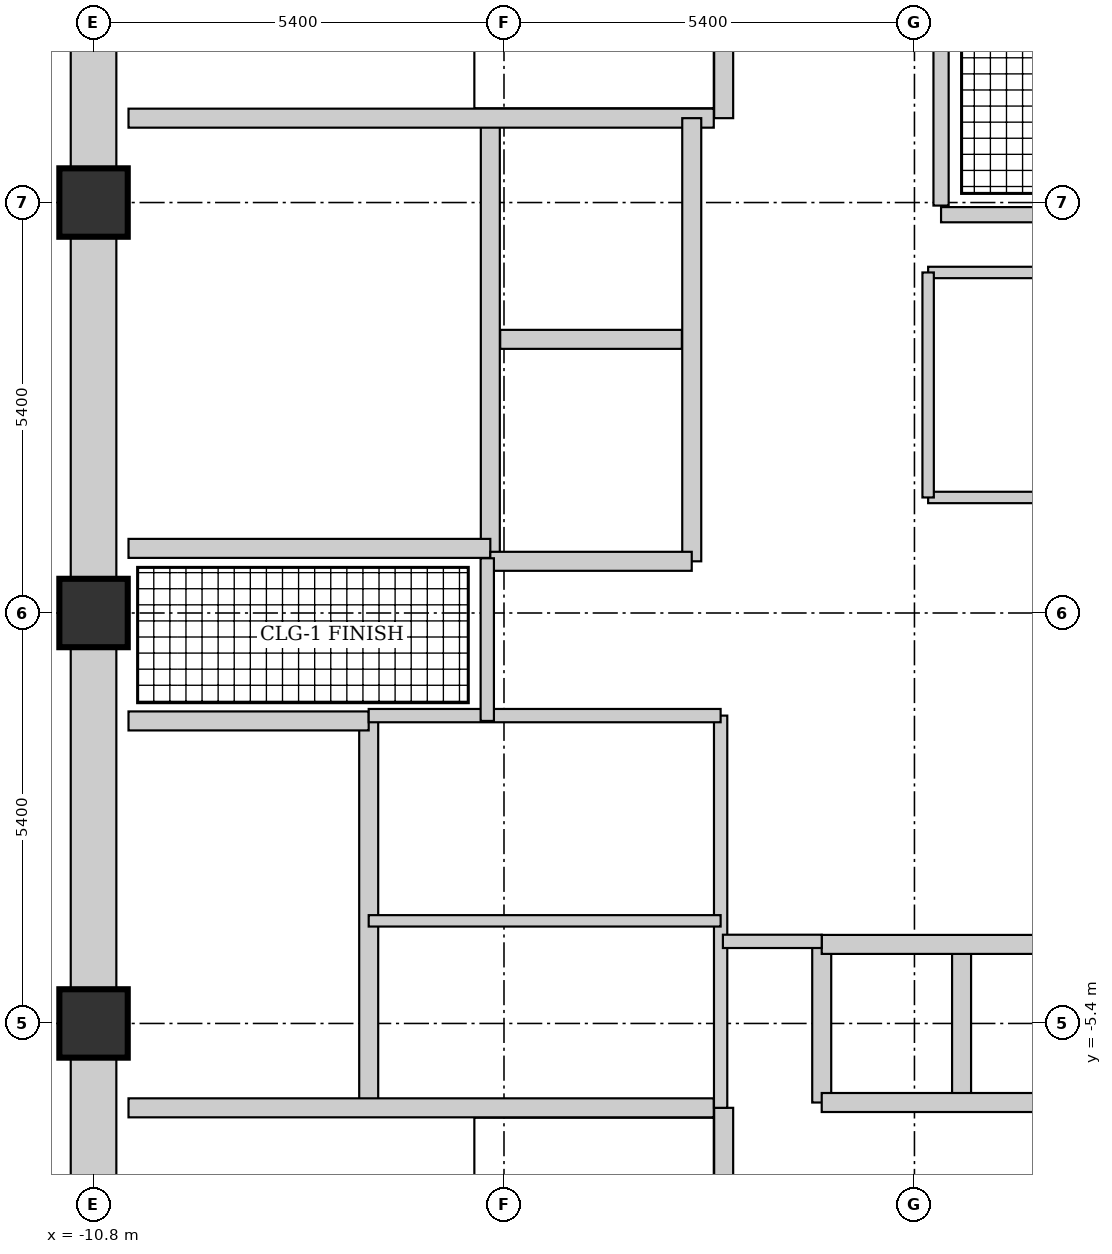
"""IFC4 building model, lengths in metres.
Left out: names, types, materials, properties, quantities, classifications, styles, units other than length and angle.
Written with IfcOpenShell. Run it as: python <this file> out.ifc"""

import sys

from ifc_helpers import new_model, si_unit, direction, frame, frame_2d, origin, origin_2d, place, context, subcontext, project, spatial, rectangle, extrude, element, fill, save


model = new_model("IFC4")
c1 = context("Model", 3, precision=1e-05, world=origin(), true_north=direction((0.0, 1.0)))
c2 = subcontext(c1, "Body", "Model", "MODEL_VIEW")
j1 = project(units=[si_unit("LENGTHUNIT", "METRE"), si_unit("PLANEANGLEUNIT", "RADIAN")], contexts=[c1])
p1 = place(None, origin())
s1 = spatial("IfcSite", under=j1, at=p1, CompositionType="ELEMENT")
p2 = place(p1, origin())
s2 = spatial("IfcBuilding", under=s1, at=p2, CompositionType="ELEMENT")
p3 = place(p2, frame((0.0, 0.0, 174.75)))
s3 = spatial("IfcBuildingStorey", under=s2, at=p3, CompositionType="ELEMENT", Elevation=174.75)
for number, where, z_axis, x_axis in (
    (1, (-10.8, -5.4, 0.0), (0.0, 0.0, 1.0), (1.0, 0.0, 0.0)),
    (2, (-10.8, 0.0, 0.0), (0.0, 0.0, 1.0), (1.0, 0.0, 0.0)),
    (3, (-10.8, 5.4, 0.0), (0.0, 0.0, 1.0), (1.0, 0.0, 0.0)),
):
    element("IfcColumn", number, at=place(p3, frame(where, z_axis=z_axis, x_axis=x_axis)), inside=s3, PredefinedType="COLUMN", context=c2, shape_type="SweptSolid", body=[
        extrude(rectangle(XDim=0.9, YDim=0.9, at=origin_2d()), origin(), (0.0, 0.0, 1.0), 3.75),
    ])
p4 = place(p3, frame((-10.8, -10.34, 0.0), z_axis=(0.0, 0.0, 1.0), x_axis=(0.0, 1.0, 0.0)))
e4 = element("IfcWall", 4, at=p4, inside=s3, PredefinedType="SHEAR", context=c2, shape_type="SweptSolid", body=[
    extrude(rectangle(XDim=4.48, YDim=0.6, at=frame_2d((2.24, 0.0))), origin(), (0.0, 0.0, 1.0), 3.75),
])
p5 = place(p3, frame((-10.8, -4.94, 0.0), z_axis=(0.0, 0.0, 1.0), x_axis=(0.0, 1.0, 0.0)))
e5 = element("IfcWall", 5, at=p5, inside=s3, PredefinedType="SHEAR", context=c2, shape_type="SweptSolid", body=[
    extrude(rectangle(XDim=4.48, YDim=0.6, at=frame_2d((2.24, 0.0))), origin(), (0.0, 0.0, 1.0), 3.75),
])
p6 = place(p5, frame((1.69, 0.0, 0.0)))
e6 = element("IfcOpeningElement", 6, at=p6, cuts=e5, PredefinedType="OPENING", context=c2, shape_type="SweptSolid", body=[
    extrude(rectangle(XDim=1.1, YDim=2.1, at=frame_2d((0.55, 1.05))), frame((0.0, 0.31, 0.0), z_axis=(0.0, -1.0, 0.0), x_axis=(1.0, 0.0, 0.0)), (0.0, 0.0, 1.0), 0.62),
])
p7 = place(p3, frame((-10.8, 0.46, 0.0), z_axis=(0.0, 0.0, 1.0), x_axis=(0.0, 1.0, 0.0)))
e7 = element("IfcWall", 7, at=p7, inside=s3, PredefinedType="SHEAR", context=c2, shape_type="SweptSolid", body=[
    extrude(rectangle(XDim=4.48, YDim=0.6, at=frame_2d((2.24, 0.0))), origin(), (0.0, 0.0, 1.0), 3.75),
])
p8 = place(p7, frame((1.69, 0.0, 0.0)))
e8 = element("IfcOpeningElement", 8, at=p8, cuts=e7, PredefinedType="OPENING", context=c2, shape_type="SweptSolid", body=[
    extrude(rectangle(XDim=1.1, YDim=2.1, at=frame_2d((0.55, 1.05))), frame((0.0, 0.31, 0.0), z_axis=(0.0, -1.0, 0.0), x_axis=(1.0, 0.0, 0.0)), (0.0, 0.0, 1.0), 0.62),
])
p9 = place(p3, frame((-10.8, 5.86, 0.0), z_axis=(0.0, 0.0, 1.0), x_axis=(0.0, 1.0, 0.0)))
e9 = element("IfcWall", 9, at=p9, inside=s3, PredefinedType="SHEAR", context=c2, shape_type="SweptSolid", body=[
    extrude(rectangle(XDim=4.48, YDim=0.6, at=frame_2d((2.24, 0.0))), origin(), (0.0, 0.0, 1.0), 3.75),
])
p10 = place(p3, frame((-5.58, 0.72, 0.0), z_axis=(0.0, 0.0, 1.0), x_axis=(0.0, 1.0, 0.0)))
e10 = element("IfcWall", 10, at=p10, inside=s3, PredefinedType="SHEAR", context=c2, shape_type="SweptSolid", body=[
    extrude(rectangle(XDim=5.79, YDim=0.25, at=frame_2d((2.895, 0.0))), origin(), (0.0, 0.0, 1.0), 3.75),
])
p11 = place(p10, frame((3.35, 0.0, 0.0)))
e11 = element("IfcOpeningElement", 11, at=p11, cuts=e10, PredefinedType="OPENING", context=c2, shape_type="SweptSolid", body=[
    extrude(rectangle(XDim=1.1, YDim=2.1, at=frame_2d((0.55, 1.05))), frame((0.0, 0.135, 0.0), z_axis=(0.0, -1.0, 0.0), x_axis=(1.0, 0.0, 0.0)), (0.0, 0.0, 1.0), 0.27),
])
p12 = place(p3, frame((-10.34, 0.85, 0.0), z_axis=(0.0, 0.0, 1.0), x_axis=(1.0, 0.0, 0.0)))
e12 = element("IfcWall", 12, at=p12, inside=s3, PredefinedType="SHEAR", context=c2, shape_type="SweptSolid", body=[
    extrude(rectangle(XDim=4.76, YDim=0.25, at=frame_2d((2.38, 0.0))), origin(), (0.0, 0.0, 1.0), 3.75),
])
p13 = place(p12, frame((1.2, 0.0, 0.0)))
e13 = element("IfcOpeningElement", 13, at=p13, cuts=e12, PredefinedType="OPENING", context=c2, shape_type="SweptSolid", body=[
    extrude(rectangle(XDim=0.85, YDim=2.1, at=frame_2d((0.425, 1.05))), frame((0.0, 0.135, 0.0), z_axis=(0.0, -1.0, 0.0), x_axis=(1.0, 0.0, 0.0)), (0.0, 0.0, 1.0), 0.27),
])
p14 = place(p3, frame((0.62, -6.34, 0.0), z_axis=(0.0, 0.0, 1.0), x_axis=(0.0, 1.0, 0.0)))
e14 = element("IfcWall", 14, at=p14, inside=s3, PredefinedType="SHEAR", context=c2, shape_type="SweptSolid", body=[
    extrude(rectangle(XDim=1.88, YDim=0.25, at=frame_2d((0.94, 0.0))), origin(), (0.0, 0.0, 1.0), 3.75),
])
p15 = place(p3, frame((-1.22, -6.44, 0.0), z_axis=(0.0, 0.0, 1.0), x_axis=(0.0, 1.0, 0.0)))
e15 = element("IfcWall", 15, at=p15, inside=s3, PredefinedType="SHEAR", context=c2, shape_type="SweptSolid", body=[
    extrude(rectangle(XDim=2.08, YDim=0.25, at=frame_2d((1.04, 0.0))), origin(), (0.0, 0.0, 1.0), 3.75),
])
p16 = place(p3, frame((-1.22, -6.44, 0.0), z_axis=(0.0, 0.0, 1.0), x_axis=(1.0, 0.0, 0.0)))
e16 = element("IfcWall", 16, at=p16, inside=s3, PredefinedType="SHEAR", context=c2, shape_type="SweptSolid", body=[
    extrude(rectangle(XDim=3.67, YDim=0.25, at=frame_2d((1.835, 0.0))), origin(), (0.0, 0.0, 1.0), 3.75),
])
p17 = place(p3, frame((-1.22, -4.36, 0.0), z_axis=(0.0, 0.0, 1.0), x_axis=(1.0, 0.0, 0.0)))
e17 = element("IfcWall", 17, at=p17, inside=s3, PredefinedType="SHEAR", context=c2, shape_type="SweptSolid", body=[
    extrude(rectangle(XDim=4.03, YDim=0.25, at=frame_2d((2.015, 0.0))), origin(), (0.0, 0.0, 1.0), 3.75),
])
p18 = place(p3, frame((-2.51, 6.51, 0.0), z_axis=(0.0, 0.0, 1.0), x_axis=(0.0, 1.0, 0.0)))
e18 = element("IfcWall", 18, at=p18, inside=s3, PredefinedType="SHEAR", context=c2, shape_type="SweptSolid", body=[
    extrude(rectangle(XDim=3.99, YDim=0.25, at=frame_2d((1.995, 0.0))), origin(), (0.0, 0.0, 1.0), 3.75),
])
p19 = place(p3, frame((-10.34, 6.51, 0.0), z_axis=(0.0, 0.0, 1.0), x_axis=(1.0, 0.0, 0.0)))
e19 = element("IfcWall", 19, at=p19, inside=s3, PredefinedType="SHEAR", context=c2, shape_type="SweptSolid", body=[
    extrude(rectangle(XDim=7.7, YDim=0.25, at=frame_2d((3.85, 0.0))), origin(), (0.0, 0.0, 1.0), 3.75),
])
p20 = place(p19, frame((0.35, 0.0, 0.0)))
e20 = element("IfcOpeningElement", 20, at=p20, cuts=e19, PredefinedType="OPENING", context=c2, shape_type="SweptSolid", body=[
    extrude(rectangle(XDim=1.1, YDim=2.1, at=frame_2d((0.55, 1.05))), frame((0.0, 0.135, 0.0), z_axis=(0.0, -1.0, 0.0), x_axis=(1.0, 0.0, 0.0)), (0.0, 0.0, 1.0), 0.27),
])
p21 = place(p3, frame((-2.51, -10.5, 0.0), z_axis=(0.0, 0.0, 1.0), x_axis=(0.0, 1.0, 0.0)))
e21 = element("IfcWall", 21, at=p21, inside=s3, PredefinedType="SHEAR", context=c2, shape_type="SweptSolid", body=[
    extrude(rectangle(XDim=3.99, YDim=0.25, at=frame_2d((1.995, 0.0))), origin(), (0.0, 0.0, 1.0), 3.75),
])
p22 = place(p3, frame((-7.18, -6.51, 0.0), z_axis=(0.0, 0.0, 1.0), x_axis=(0.0, 1.0, 0.0)))
e22 = element("IfcWall", 22, at=p22, inside=s3, PredefinedType="SHEAR", context=c2, shape_type="SweptSolid", body=[
    extrude(rectangle(XDim=5.09, YDim=0.25, at=frame_2d((2.545, 0.0))), origin(), (0.0, 0.0, 1.0), 3.75),
])
p23 = place(p3, frame((-10.34, -1.42, 0.0), z_axis=(0.0, 0.0, 1.0), x_axis=(1.0, 0.0, 0.0)))
e23 = element("IfcWall", 23, at=p23, inside=s3, PredefinedType="SHEAR", context=c2, shape_type="SweptSolid", body=[
    extrude(rectangle(XDim=3.16, YDim=0.25, at=frame_2d((1.58, 0.0))), origin(), (0.0, 0.0, 1.0), 3.75),
])
p24 = place(p3, frame((-10.34, -6.51, 0.0), z_axis=(0.0, 0.0, 1.0), x_axis=(1.0, 0.0, 0.0)))
e24 = element("IfcWall", 24, at=p24, inside=s3, PredefinedType="SHEAR", context=c2, shape_type="SweptSolid", body=[
    extrude(rectangle(XDim=7.7, YDim=0.25, at=frame_2d((3.85, 0.0))), origin(), (0.0, 0.0, 1.0), 3.75),
])
p25 = place(p24, frame((0.35, 0.0, 0.0)))
e25 = element("IfcOpeningElement", 25, at=p25, cuts=e24, PredefinedType="OPENING", context=c2, shape_type="SweptSolid", body=[
    extrude(rectangle(XDim=1.1, YDim=2.1, at=frame_2d((0.55, 1.05))), frame((0.0, 0.135, 0.0), z_axis=(0.0, -1.0, 0.0), x_axis=(1.0, 0.0, 0.0)), (0.0, 0.0, 1.0), 0.27),
])
p26 = place(p3, frame((-2.93, 0.68, 0.0), z_axis=(0.0, 0.0, 1.0), x_axis=(0.0, 1.0, 0.0)))
e26 = element("IfcWall", 26, at=p26, inside=s3, PredefinedType="SHEAR", context=c2, shape_type="SweptSolid", body=[
    extrude(rectangle(XDim=5.83, YDim=0.25, at=frame_2d((2.915, 0.0))), origin(), (0.0, 0.0, 1.0), 3.75),
])
p27 = place(p26, frame((0.75, 0.0, 0.0)))
e27 = element("IfcOpeningElement", 27, at=p27, cuts=e26, PredefinedType="OPENING", context=c2, shape_type="SweptSolid", body=[
    extrude(rectangle(XDim=1.2, YDim=2.1, at=frame_2d((0.6, 1.05))), frame((0.0, 0.135, 0.0), z_axis=(0.0, -1.0, 0.0), x_axis=(1.0, 0.0, 0.0)), (0.0, 0.0, 1.0), 0.27),
])
p28 = place(p3, frame((-5.45, 3.6, 0.0), z_axis=(0.0, 0.0, 1.0), x_axis=(1.0, 0.0, 0.0)))
e28 = element("IfcWall", 28, at=p28, inside=s3, PredefinedType="SHEAR", context=c2, shape_type="SweptSolid", body=[
    extrude(rectangle(XDim=2.39, YDim=0.25, at=frame_2d((1.195, 0.0))), origin(), (0.0, 0.0, 1.0), 3.75),
])
p29 = place(p3, frame((-5.58, 0.68, 0.0), z_axis=(0.0, 0.0, 1.0), x_axis=(1.0, 0.0, 0.0)))
e29 = element("IfcWall", 29, at=p29, inside=s3, PredefinedType="SHEAR", context=c2, shape_type="SweptSolid", body=[
    extrude(rectangle(XDim=2.65, YDim=0.25, at=frame_2d((1.325, 0.0))), origin(), (0.0, 0.0, 1.0), 3.75),
])
for number, where, z_axis, x_axis in (
    (30, (0.18, 4.48, 0.0), (0.0, 0.0, 1.0), (1.0, 0.0, 0.0)),
    (31, (0.18, 1.52, 0.0), (0.0, 0.0, 1.0), (1.0, 0.0, 0.0)),
):
    element("IfcWall", number, at=place(p3, frame(where, z_axis=z_axis, x_axis=x_axis)), inside=s3, PredefinedType="PARTITIONING", context=c2, shape_type="SweptSolid", body=[
        extrude(rectangle(XDim=2.67, YDim=0.15, at=frame_2d((1.335, 0.0))), origin(), (0.0, 0.0, 1.0), 3.57),
    ])
p30 = place(p3, frame((0.18, 1.52, 0.0), z_axis=(0.0, 0.0, 1.0), x_axis=(0.0, 1.0, 0.0)))
e32 = element("IfcWall", 32, at=p30, inside=s3, PredefinedType="PARTITIONING", context=c2, shape_type="SweptSolid", body=[
    extrude(rectangle(XDim=2.96, YDim=0.15, at=frame_2d((1.48, 0.0))), origin(), (0.0, 0.0, 1.0), 3.57),
])
p31 = place(p30, frame((0.95, 0.0, 0.0)))
e33 = element("IfcOpeningElement", 33, at=p31, cuts=e32, PredefinedType="OPENING", context=c2, shape_type="SweptSolid", body=[
    extrude(rectangle(XDim=0.85, YDim=2.1, at=frame_2d((0.425, 1.05))), frame((0.0, 0.085, 0.0), z_axis=(0.0, -1.0, 0.0), x_axis=(1.0, 0.0, 0.0)), (0.0, 0.0, 1.0), 0.17),
])
p32 = place(p3, frame((0.35, 5.24, 0.0), z_axis=(0.0, 0.0, 1.0), x_axis=(1.0, 0.0, 0.0)))
e34 = element("IfcWall", 34, at=p32, inside=s3, PredefinedType="PARTITIONING", context=c2, shape_type="SweptSolid", body=[
    extrude(rectangle(XDim=5.15, YDim=0.2, at=frame_2d((2.575, 0.0))), origin(), (0.0, 0.0, 1.0), 3.57),
])
p33 = place(p32, frame((0.8, 0.0, 0.0)))
e35 = element("IfcOpeningElement", 35, at=p33, cuts=e34, PredefinedType="OPENING", context=c2, shape_type="SweptSolid", body=[
    extrude(rectangle(XDim=1.1, YDim=2.1, at=frame_2d((0.55, 1.05))), frame((0.0, 0.11, 0.0), z_axis=(0.0, -1.0, 0.0), x_axis=(1.0, 0.0, 0.0)), (0.0, 0.0, 1.0), 0.22),
])
p34 = place(p3, frame((0.35, 5.36, 0.0), z_axis=(0.0, 0.0, 1.0), x_axis=(0.0, 1.0, 0.0)))
e36 = element("IfcWall", 36, at=p34, inside=s3, PredefinedType="PARTITIONING", context=c2, shape_type="SweptSolid", body=[
    extrude(rectangle(XDim=4.98, YDim=0.2, at=frame_2d((2.49, 0.0))), origin(), (0.0, 0.0, 1.0), 3.57),
])
p35 = place(p3, frame((-2.55, -6.51, 0.0), z_axis=(0.0, 0.0, 1.0), x_axis=(0.0, 1.0, 0.0)))
e37 = element("IfcWall", 37, at=p35, inside=s3, PredefinedType="PARTITIONING", context=c2, shape_type="SweptSolid", body=[
    extrude(rectangle(XDim=5.16, YDim=0.175, at=frame_2d((2.58, 0.0))), origin(), (0.0, 0.0, 1.0), 3.57),
])
p36 = place(p35, frame((3.3, 0.0, 0.0)))
e38 = element("IfcOpeningElement", 38, at=p36, cuts=e37, PredefinedType="OPENING", context=c2, shape_type="SweptSolid", body=[
    extrude(rectangle(XDim=0.85, YDim=2.1, at=frame_2d((0.425, 1.05))), frame((0.0, 0.097, 0.0), z_axis=(0.0, -1.0, 0.0), x_axis=(1.0, 0.0, 0.0)), (0.0, 0.0, 1.0), 0.195),
])
p37 = place(p3, frame((-7.18, -4.05, 0.0), z_axis=(0.0, 0.0, 1.0), x_axis=(1.0, 0.0, 0.0)))
e39 = element("IfcWall", 39, at=p37, inside=s3, PredefinedType="PARTITIONING", context=c2, shape_type="SweptSolid", body=[
    extrude(rectangle(XDim=4.63, YDim=0.15, at=frame_2d((2.315, 0.0))), origin(), (0.0, 0.0, 1.0), 3.57),
])
p38 = place(p37, frame((1.0, 0.0, 0.0)))
e40 = element("IfcOpeningElement", 40, at=p38, cuts=e39, PredefinedType="OPENING", context=c2, shape_type="SweptSolid", body=[
    extrude(rectangle(XDim=0.85, YDim=2.1, at=frame_2d((0.425, 1.05))), frame((0.0, 0.085, 0.0), z_axis=(0.0, -1.0, 0.0), x_axis=(1.0, 0.0, 0.0)), (0.0, 0.0, 1.0), 0.17),
])
p39 = place(p3, frame((-7.18, -1.35, 0.0), z_axis=(0.0, 0.0, 1.0), x_axis=(1.0, 0.0, 0.0)))
e41 = element("IfcWall", 41, at=p39, inside=s3, PredefinedType="PARTITIONING", context=c2, shape_type="SweptSolid", body=[
    extrude(rectangle(XDim=4.63, YDim=0.175, at=frame_2d((2.315, 0.0))), origin(), (0.0, 0.0, 1.0), 3.57),
])
p40 = place(p3, frame((-5.62, -1.42, 0.0), z_axis=(0.0, 0.0, 1.0), x_axis=(0.0, 1.0, 0.0)))
e42 = element("IfcWall", 42, at=p40, inside=s3, PredefinedType="PARTITIONING", context=c2, shape_type="SweptSolid", body=[
    extrude(rectangle(XDim=2.14, YDim=0.175, at=frame_2d((1.07, 0.0))), origin(), (0.0, 0.0, 1.0), 3.57),
])
p41 = place(p3, frame((-2.52, -4.32, 0.0), z_axis=(0.0, 0.0, 1.0), x_axis=(1.0, 0.0, 0.0)))
e43 = element("IfcWall", 43, at=p41, inside=s3, PredefinedType="PARTITIONING", context=c2, shape_type="SweptSolid", body=[
    extrude(rectangle(XDim=1.3, YDim=0.175, at=frame_2d((0.65, 0.0))), origin(), (0.0, 0.0, 1.0), 3.57),
])
p42 = place(p41, frame((0.22, 0.0, 0.0)))
e44 = element("IfcOpeningElement", 44, at=p42, cuts=e43, PredefinedType="OPENING", context=c2, shape_type="SweptSolid", body=[
    extrude(rectangle(XDim=0.85, YDim=2.1, at=frame_2d((0.425, 1.05))), frame((0.0, 0.097, 0.0), z_axis=(0.0, -1.0, 0.0), x_axis=(1.0, 0.0, 0.0)), (0.0, 0.0, 1.0), 0.195),
])
p43 = place(p31, origin())
e45 = element("IfcDoor", 45, at=p43, inside=s3, OperationType="SINGLE_SWING_RIGHT", PredefinedType="DOOR", context=c2, shape_type="SweptSolid", body=[
    extrude(rectangle(XDim=0.85, YDim=2.1, at=frame_2d((0.425, 1.05))), frame((0.0, 0.025, 0.0), z_axis=(0.0, -1.0, 0.0), x_axis=(1.0, 0.0, 0.0)), (0.0, 0.0, 1.0), 0.05),
])
fill(e33, e45)
p44 = place(p20, origin())
e46 = element("IfcDoor", 46, at=p44, inside=s3, OperationType="SINGLE_SWING_LEFT", PredefinedType="DOOR", context=c2, shape_type="SweptSolid", body=[
    extrude(rectangle(XDim=1.1, YDim=2.1, at=frame_2d((0.55, 1.05))), frame((0.0, 0.025, 0.0), z_axis=(0.0, -1.0, 0.0), x_axis=(1.0, 0.0, 0.0)), (0.0, 0.0, 1.0), 0.05),
])
fill(e20, e46)
p45 = place(p25, origin())
e47 = element("IfcDoor", 47, at=p45, inside=s3, OperationType="SINGLE_SWING_RIGHT", PredefinedType="DOOR", context=c2, shape_type="SweptSolid", body=[
    extrude(rectangle(XDim=1.1, YDim=2.1, at=frame_2d((0.55, 1.05))), frame((0.0, 0.025, 0.0), z_axis=(0.0, -1.0, 0.0), x_axis=(1.0, 0.0, 0.0)), (0.0, 0.0, 1.0), 0.05),
])
fill(e25, e47)
p46 = place(p8, origin())
e48 = element("IfcDoor", 48, at=p46, inside=s3, OperationType="SINGLE_SWING_LEFT", PredefinedType="DOOR", context=c2, shape_type="SweptSolid", body=[
    extrude(rectangle(XDim=1.1, YDim=2.1, at=frame_2d((0.55, 1.05))), frame((0.0, 0.025, 0.0), z_axis=(0.0, -1.0, 0.0), x_axis=(1.0, 0.0, 0.0)), (0.0, 0.0, 1.0), 0.05),
])
fill(e8, e48)
p47 = place(p6, origin())
e49 = element("IfcDoor", 49, at=p47, inside=s3, OperationType="SINGLE_SWING_LEFT", PredefinedType="DOOR", context=c2, shape_type="SweptSolid", body=[
    extrude(rectangle(XDim=1.1, YDim=2.1, at=frame_2d((0.55, 1.05))), frame((0.0, 0.025, 0.0), z_axis=(0.0, -1.0, 0.0), x_axis=(1.0, 0.0, 0.0)), (0.0, 0.0, 1.0), 0.05),
])
fill(e6, e49)
p48 = place(p13, origin())
e50 = element("IfcDoor", 50, at=p48, inside=s3, OperationType="SINGLE_SWING_RIGHT", PredefinedType="DOOR", context=c2, shape_type="SweptSolid", body=[
    extrude(rectangle(XDim=0.85, YDim=2.1, at=frame_2d((0.425, 1.05))), frame((0.0, 0.025, 0.0), z_axis=(0.0, -1.0, 0.0), x_axis=(1.0, 0.0, 0.0)), (0.0, 0.0, 1.0), 0.05),
])
fill(e13, e50)
p49 = place(p11, origin())
e51 = element("IfcDoor", 51, at=p49, inside=s3, OperationType="SLIDING_TO_LEFT", PredefinedType="DOOR", context=c2, shape_type="SweptSolid", body=[
    extrude(rectangle(XDim=1.1, YDim=2.1, at=frame_2d((0.55, 1.05))), frame((0.0, 0.025, 0.0), z_axis=(0.0, -1.0, 0.0), x_axis=(1.0, 0.0, 0.0)), (0.0, 0.0, 1.0), 0.05),
])
fill(e11, e51)
p50 = place(p27, origin())
e52 = element("IfcDoor", 52, at=p50, inside=s3, OperationType="SLIDING_TO_LEFT", PredefinedType="DOOR", context=c2, shape_type="SweptSolid", body=[
    extrude(rectangle(XDim=1.2, YDim=2.1, at=frame_2d((0.6, 1.05))), frame((0.0, 0.025, 0.0), z_axis=(0.0, -1.0, 0.0), x_axis=(1.0, 0.0, 0.0)), (0.0, 0.0, 1.0), 0.05),
])
fill(e27, e52)
p51 = place(p33, origin())
e53 = element("IfcDoor", 53, at=p51, inside=s3, OperationType="SINGLE_SWING_LEFT", PredefinedType="DOOR", context=c2, shape_type="SweptSolid", body=[
    extrude(rectangle(XDim=1.1, YDim=2.1, at=frame_2d((0.55, 1.05))), frame((0.0, 0.025, 0.0), z_axis=(0.0, -1.0, 0.0), x_axis=(1.0, 0.0, 0.0)), (0.0, 0.0, 1.0), 0.05),
])
fill(e35, e53)
p52 = place(p42, origin())
e54 = element("IfcDoor", 54, at=p52, inside=s3, OperationType="SINGLE_SWING_LEFT", PredefinedType="DOOR", context=c2, shape_type="SweptSolid", body=[
    extrude(rectangle(XDim=0.85, YDim=2.1, at=frame_2d((0.425, 1.05))), frame((0.0, 0.025, 0.0), z_axis=(0.0, -1.0, 0.0), x_axis=(1.0, 0.0, 0.0)), (0.0, 0.0, 1.0), 0.05),
])
fill(e44, e54)
p53 = place(p36, origin())
e55 = element("IfcDoor", 55, at=p53, inside=s3, OperationType="SINGLE_SWING_LEFT", PredefinedType="DOOR", context=c2, shape_type="SweptSolid", body=[
    extrude(rectangle(XDim=0.85, YDim=2.1, at=frame_2d((0.425, 1.05))), frame((0.0, 0.025, 0.0), z_axis=(0.0, -1.0, 0.0), x_axis=(1.0, 0.0, 0.0)), (0.0, 0.0, 1.0), 0.05),
])
fill(e38, e55)
p54 = place(p38, origin())
e56 = element("IfcDoor", 56, at=p54, inside=s3, OperationType="SINGLE_SWING_RIGHT", PredefinedType="DOOR", context=c2, shape_type="SweptSolid", body=[
    extrude(rectangle(XDim=0.85, YDim=2.1, at=frame_2d((0.425, 1.05))), frame((0.0, 0.025, 0.0), z_axis=(0.0, -1.0, 0.0), x_axis=(1.0, 0.0, 0.0)), (0.0, 0.0, 1.0), 0.05),
])
fill(e40, e56)
save(model, sys.argv[1])
